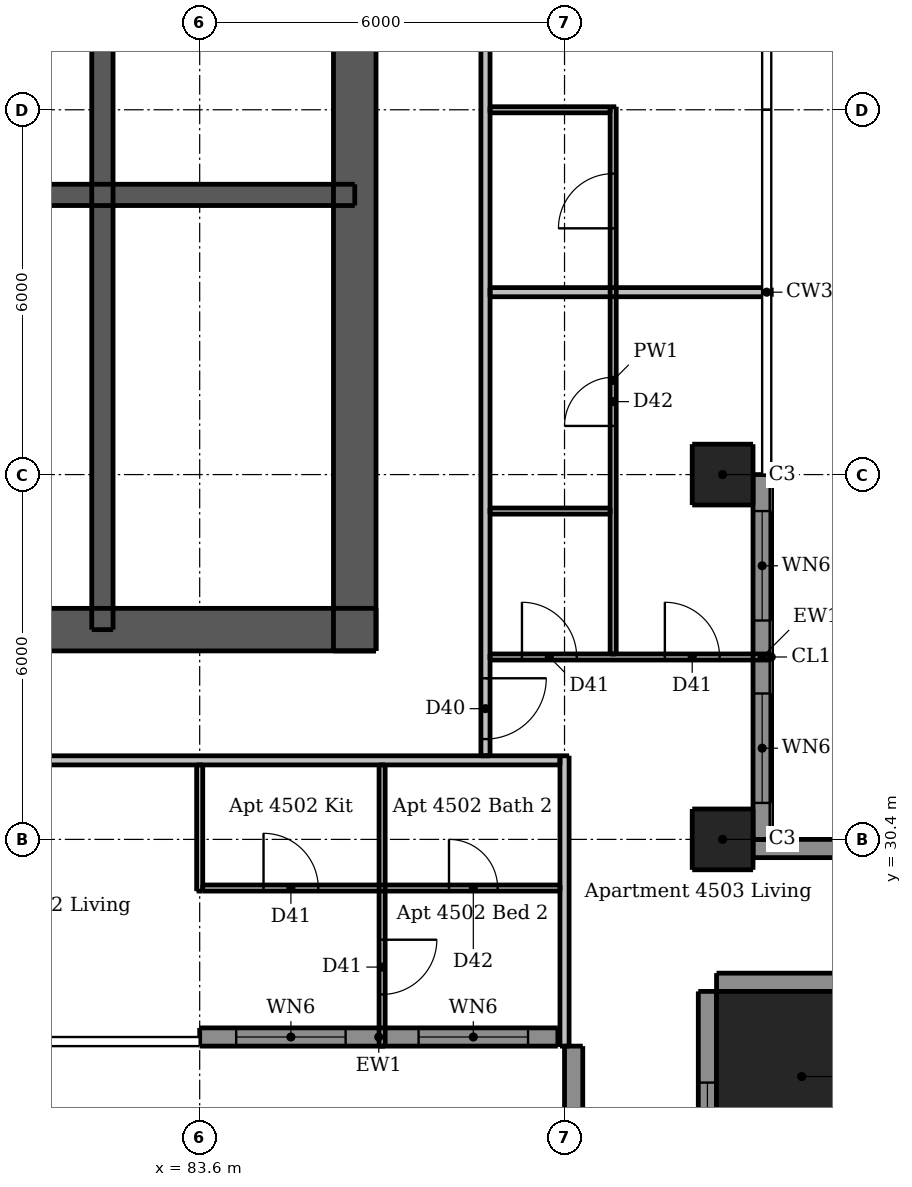
"""IFC4 building model, lengths in metres.
Left out: names, types, materials, properties, quantities, classifications, styles, units other than length and angle.
Written with IfcOpenShell. Run it as: python <this file> out.ifc"""

import sys

from ifc_helpers import new_model, si_unit, direction, frame, frame_2d, origin, origin_2d, place, context, subcontext, project, spatial, rectangle, extrude, element, fill, save


model = new_model("IFC4")
c1 = context("Model", 3, precision=1e-05, world=origin(), true_north=direction((0.0, 1.0)))
c2 = subcontext(c1, "Body", "Model", "MODEL_VIEW")
j1 = project(units=[si_unit("LENGTHUNIT", "METRE"), si_unit("PLANEANGLEUNIT", "RADIAN")], contexts=[c1])
p1 = place(None, origin())
s1 = spatial("IfcSite", under=j1, at=p1, CompositionType="ELEMENT")
p2 = place(p1, origin())
s2 = spatial("IfcBuilding", under=s1, at=p2, CompositionType="ELEMENT")
p3 = place(p2, frame((0.0, 0.0, 168.1)))
s3 = spatial("IfcBuildingStorey", under=s2, at=p3, CompositionType="ELEMENT", Elevation=168.1)
p4 = place(p3, frame((62.5, 33.85, 0.0), z_axis=(0.0, 0.0, 1.0), x_axis=(1.0, 0.0, 0.0)))
e1 = element("IfcWall", 1, at=p4, inside=s3, PredefinedType="SHEAR", context=c2, shape_type="SweptSolid", body=[
    extrude(rectangle(XDim=24.0, YDim=0.7, at=frame_2d((12.0, 0.0))), origin(), (0.0, 0.0, 1.0), 3.05),
])
p5 = place(p4, frame((1.962, 0.0, 0.0)))
e2 = element("IfcOpeningElement", 2, at=p5, cuts=e1, PredefinedType="OPENING", context=c2, shape_type="SweptSolid", body=[
    extrude(rectangle(XDim=1.1, YDim=2.1, at=frame_2d((0.55, 1.05))), frame((0.0, 0.36, 0.0), z_axis=(0.0, -1.0, 0.0), x_axis=(1.0, 0.0, 0.0)), (0.0, 0.0, 1.0), 0.72),
])
p6 = place(p4, frame((20.938, 0.0, 0.0)))
e3 = element("IfcOpeningElement", 3, at=p6, cuts=e1, PredefinedType="OPENING", context=c2, shape_type="SweptSolid", body=[
    extrude(rectangle(XDim=1.1, YDim=2.1, at=frame_2d((0.55, 1.05))), frame((0.0, 0.36, 0.0), z_axis=(0.0, -1.0, 0.0), x_axis=(1.0, 0.0, 0.0)), (0.0, 0.0, 1.0), 0.72),
])
p7 = place(p4, frame((8.0, 0.0, 0.0)))
e4 = element("IfcOpeningElement", 4, at=p7, cuts=e1, PredefinedType="OPENING", context=c2, shape_type="SweptSolid", body=[
    extrude(rectangle(XDim=1.1, YDim=2.1, at=frame_2d((0.55, 1.05))), frame((0.0, 0.36, 0.0), z_axis=(0.0, -1.0, 0.0), x_axis=(1.0, 0.0, 0.0)), (0.0, 0.0, 1.0), 0.72),
])
p8 = place(p4, frame((15.3, 0.0, 0.0)))
e5 = element("IfcOpeningElement", 5, at=p8, cuts=e1, PredefinedType="OPENING", context=c2, shape_type="SweptSolid", body=[
    extrude(rectangle(XDim=0.9, YDim=2.1, at=frame_2d((0.45, 1.05))), frame((0.0, 0.36, 0.0), z_axis=(0.0, -1.0, 0.0), x_axis=(1.0, 0.0, 0.0)), (0.0, 0.0, 1.0), 0.72),
])
p9 = place(p3, frame((86.15, 33.5, 0.0), z_axis=(0.0, 0.0, 1.0), x_axis=(0.0, 1.0, 0.0)))
e6 = element("IfcWall", 6, at=p9, inside=s3, PredefinedType="SHEAR", context=c2, shape_type="SweptSolid", body=[
    extrude(rectangle(XDim=24.0, YDim=0.7, at=frame_2d((12.0, 0.0))), origin(), (0.0, 0.0, 1.0), 3.05),
])
p10 = place(p9, frame((11.2, 0.0, 0.0)))
e7 = element("IfcOpeningElement", 7, at=p10, cuts=e6, PredefinedType="OPENING", context=c2, shape_type="SweptSolid", body=[
    extrude(rectangle(XDim=1.6, YDim=2.1, at=frame_2d((0.8, 1.05))), frame((0.0, 0.36, 0.0), z_axis=(0.0, -1.0, 0.0), x_axis=(1.0, 0.0, 0.0)), (0.0, 0.0, 1.0), 0.72),
])
p11 = place(p3, frame((62.85, 41.0, 0.0), z_axis=(0.0, 0.0, 1.0), x_axis=(1.0, 0.0, 0.0)))
e8 = element("IfcWall", 8, at=p11, inside=s3, PredefinedType="SHEAR", context=c2, shape_type="SweptSolid", body=[
    extrude(rectangle(XDim=23.3, YDim=0.35, at=frame_2d((11.65, 0.0))), origin(), (0.0, 0.0, 1.0), 3.05),
])
p12 = place(p3, frame((82.0, 33.85, 0.0), z_axis=(0.0, 0.0, 1.0), x_axis=(0.0, 1.0, 0.0)))
e9 = element("IfcWall", 9, at=p12, inside=s3, PredefinedType="SHEAR", context=c2, shape_type="SweptSolid", body=[
    extrude(rectangle(XDim=10.05, YDim=0.35, at=frame_2d((5.025, 0.0))), origin(), (0.0, 0.0, 1.0), 3.05),
])
for number, where, z_axis, x_axis in (
    (10, (92.2, 30.4, 0.0), (0.0, 0.0, 1.0), (1.0, 0.0, 0.0)),
    (11, (92.2, 36.4, 0.0), (0.0, 0.0, 1.0), (1.0, 0.0, 0.0)),
):
    element("IfcColumn", number, at=place(p3, frame(where, z_axis=z_axis, x_axis=x_axis)), inside=s3, PredefinedType="COLUMN", context=c2, shape_type="SweptSolid", body=[
        extrude(rectangle(XDim=1.0, YDim=1.0, at=origin_2d()), origin(), (0.0, 0.0, 1.0), 3.05),
    ])
p13 = place(p3, frame((93.5, 26.5, 0.0), z_axis=(0.0, 0.0, 1.0), x_axis=(1.0, 0.0, 0.0)))
e12 = element("IfcColumn", 12, at=p13, inside=s3, PredefinedType="COLUMN", context=c2, shape_type="SweptSolid", body=[
    extrude(rectangle(XDim=2.8, YDim=2.8, at=origin_2d()), origin(), (0.0, 0.0, 1.0), 3.3),
])
p14 = place(p3, frame((89.75, 27.0, 0.0), z_axis=(0.0, 0.0, 1.0), x_axis=(0.0, -1.0, 0.0)))
e13 = element("IfcWall", 13, at=p14, inside=s3, PredefinedType="SOLIDWALL", context=c2, shape_type="SweptSolid", body=[
    extrude(rectangle(XDim=1.7, YDim=0.3, at=frame_2d((0.85, 0.0))), origin(), (0.0, 0.0, 1.0), 3.05),
])
p15 = place(p3, frame((91.95, 22.5, 0.0), z_axis=(0.0, 0.0, 1.0), x_axis=(0.0, 1.0, 0.0)))
e14 = element("IfcWall", 14, at=p15, inside=s3, PredefinedType="SOLIDWALL", context=c2, shape_type="SweptSolid", body=[
    extrude(rectangle(XDim=5.4, YDim=0.3, at=frame_2d((2.7, 0.0))), origin(), (0.0, 0.0, 1.0), 3.05),
])
p16 = place(p15, frame((1.5, 0.0, 0.15)))
e15 = element("IfcOpeningElement", 15, at=p16, cuts=e14, PredefinedType="OPENING", context=c2, shape_type="SweptSolid", body=[
    extrude(rectangle(XDim=2.4, YDim=2.1, at=frame_2d((1.2, 1.05))), frame((0.0, 0.16, 0.0), z_axis=(0.0, -1.0, 0.0), x_axis=(1.0, 0.0, 0.0)), (0.0, 0.0, 1.0), 0.32),
])
p17 = place(p3, frame((92.1, 28.05, 0.0), z_axis=(0.0, 0.0, 1.0), x_axis=(1.0, 0.0, 0.0)))
e16 = element("IfcWall", 16, at=p17, inside=s3, PredefinedType="SOLIDWALL", context=c2, shape_type="SweptSolid", body=[
    extrude(rectangle(XDim=5.4, YDim=0.3, at=frame_2d((2.7, 0.0))), origin(), (0.0, 0.0, 1.0), 3.05),
])
p18 = place(p3, frame((97.5, 30.25, 0.0), z_axis=(0.0, 0.0, 1.0), x_axis=(-1.0, 0.0, 0.0)))
e17 = element("IfcWall", 17, at=p18, inside=s3, PredefinedType="SOLIDWALL", context=c2, shape_type="SweptSolid", body=[
    extrude(rectangle(XDim=4.8, YDim=0.3, at=frame_2d((2.4, 0.0))), origin(), (0.0, 0.0, 1.0), 3.05),
])
p19 = place(p18, frame((1.05, 0.0, 0.15)))
e18 = element("IfcOpeningElement", 18, at=p19, cuts=e17, PredefinedType="OPENING", context=c2, shape_type="SweptSolid", body=[
    extrude(rectangle(XDim=2.4, YDim=2.1, at=frame_2d((1.2, 1.05))), frame((0.0, 0.16, 0.0), z_axis=(0.0, -1.0, 0.0), x_axis=(1.0, 0.0, 0.0)), (0.0, 0.0, 1.0), 0.32),
])
p20 = place(p3, frame((83.6, 27.15, 0.0), z_axis=(0.0, 0.0, 1.0), x_axis=(1.0, 0.0, 0.0)))
e19 = element("IfcWall", 19, at=p20, inside=s3, PredefinedType="SOLIDWALL", context=c2, shape_type="SweptSolid", body=[
    extrude(rectangle(XDim=5.89, YDim=0.3, at=frame_2d((2.945, 0.0))), origin(), (0.0, 0.0, 1.0), 3.05),
])
p21 = place(p20, frame((0.6, 0.0, 0.15)))
e20 = element("IfcOpeningElement", 20, at=p21, cuts=e19, PredefinedType="OPENING", context=c2, shape_type="SweptSolid", body=[
    extrude(rectangle(XDim=1.8, YDim=2.1, at=frame_2d((0.9, 1.05))), frame((0.0, 0.16, 0.0), z_axis=(0.0, -1.0, 0.0), x_axis=(1.0, 0.0, 0.0)), (0.0, 0.0, 1.0), 0.32),
])
p22 = place(p20, frame((3.6, 0.0, 0.15)))
e21 = element("IfcOpeningElement", 21, at=p22, cuts=e19, PredefinedType="OPENING", context=c2, shape_type="SweptSolid", body=[
    extrude(rectangle(XDim=1.8, YDim=2.1, at=frame_2d((0.9, 1.05))), frame((0.0, 0.16, 0.0), z_axis=(0.0, -1.0, 0.0), x_axis=(1.0, 0.0, 0.0)), (0.0, 0.0, 1.0), 0.32),
])
p23 = place(p3, frame((92.85, 30.4, 0.0), z_axis=(0.0, 0.0, 1.0), x_axis=(0.0, 1.0, 0.0)))
e22 = element("IfcWall", 22, at=p23, inside=s3, PredefinedType="SOLIDWALL", context=c2, shape_type="SweptSolid", body=[
    extrude(rectangle(XDim=6.0, YDim=0.3, at=frame_2d((3.0, 0.0))), origin(), (0.0, 0.0, 1.0), 3.05),
])
p24 = place(p23, frame((0.6, 0.0, 0.15)))
e23 = element("IfcOpeningElement", 23, at=p24, cuts=e22, PredefinedType="OPENING", context=c2, shape_type="SweptSolid", body=[
    extrude(rectangle(XDim=1.8, YDim=2.1, at=frame_2d((0.9, 1.05))), frame((0.0, 0.16, 0.0), z_axis=(0.0, -1.0, 0.0), x_axis=(1.0, 0.0, 0.0)), (0.0, 0.0, 1.0), 0.32),
])
p25 = place(p23, frame((3.6, 0.0, 0.15)))
e24 = element("IfcOpeningElement", 24, at=p25, cuts=e22, PredefinedType="OPENING", context=c2, shape_type="SweptSolid", body=[
    extrude(rectangle(XDim=1.8, YDim=2.1, at=frame_2d((0.9, 1.05))), frame((0.0, 0.16, 0.0), z_axis=(0.0, -1.0, 0.0), x_axis=(1.0, 0.0, 0.0)), (0.0, 0.0, 1.0), 0.32),
])
p26 = place(p3, frame((83.6, 29.55, 0.0), z_axis=(0.0, 0.0, 1.0), x_axis=(0.0, 1.0, 0.0)))
e25 = element("IfcWall", 25, at=p26, inside=s3, PredefinedType="PARTITIONING", context=c2, shape_type="SweptSolid", body=[
    extrude(rectangle(XDim=2.075, YDim=0.1, at=frame_2d((1.038, 0.0))), origin(), (0.0, 0.0, 1.0), 2.59),
])
p27 = place(p3, frame((86.6, 31.625, 0.0), z_axis=(0.0, 0.0, 1.0), x_axis=(0.0, -1.0, 0.0)))
e26 = element("IfcWall", 26, at=p27, inside=s3, PredefinedType="PARTITIONING", context=c2, shape_type="SweptSolid", body=[
    extrude(rectangle(XDim=4.625, YDim=0.1, at=frame_2d((2.312, 0.0))), origin(), (0.0, 0.0, 1.0), 3.05),
])
p28 = place(p27, frame((2.875, 0.0, 0.0)))
e27 = element("IfcOpeningElement", 27, at=p28, cuts=e26, PredefinedType="OPENING", context=c2, shape_type="SweptSolid", body=[
    extrude(rectangle(XDim=0.9, YDim=2.1, at=frame_2d((0.45, 1.05))), frame((0.0, 0.06, 0.0), z_axis=(0.0, -1.0, 0.0), x_axis=(1.0, 0.0, 0.0)), (0.0, 0.0, 1.0), 0.12),
])
p29 = place(p3, frame((90.4, 33.45, 0.0), z_axis=(0.0, 0.0, 1.0), x_axis=(0.0, 1.0, 0.0)))
e28 = element("IfcWall", 28, at=p29, inside=s3, PredefinedType="PARTITIONING", context=c2, shape_type="SweptSolid", body=[
    extrude(rectangle(XDim=9.0, YDim=0.1, at=frame_2d((4.5, 0.0))), origin(), (0.0, 0.0, 1.0), 3.05),
])
p30 = place(p29, frame((3.75, 0.0, 0.0)))
e29 = element("IfcOpeningElement", 29, at=p30, cuts=e28, PredefinedType="OPENING", context=c2, shape_type="SweptSolid", body=[
    extrude(rectangle(XDim=0.8, YDim=2.1, at=frame_2d((0.4, 1.05))), frame((0.0, 0.06, 0.0), z_axis=(0.0, -1.0, 0.0), x_axis=(1.0, 0.0, 0.0)), (0.0, 0.0, 1.0), 0.12),
])
p31 = place(p29, frame((7.0, 0.0, 0.0)))
e30 = element("IfcOpeningElement", 30, at=p31, cuts=e28, PredefinedType="OPENING", context=c2, shape_type="SweptSolid", body=[
    extrude(rectangle(XDim=0.9, YDim=2.1, at=frame_2d((0.45, 1.05))), frame((0.0, 0.06, 0.0), z_axis=(0.0, -1.0, 0.0), x_axis=(1.0, 0.0, 0.0)), (0.0, 0.0, 1.0), 0.12),
])
p32 = place(p3, frame((88.375, 42.4, 0.0), z_axis=(0.0, 0.0, 1.0), x_axis=(1.0, 0.0, 0.0)))
e31 = element("IfcWall", 31, at=p32, inside=s3, PredefinedType="PARTITIONING", context=c2, shape_type="SweptSolid", body=[
    extrude(rectangle(XDim=1.975, YDim=0.1, at=frame_2d((0.988, 0.0))), origin(), (0.0, 0.0, 1.0), 2.59),
])
p33 = place(p3, frame((88.375, 35.8, 0.0), z_axis=(0.0, 0.0, 1.0), x_axis=(1.0, 0.0, 0.0)))
e32 = element("IfcWall", 32, at=p33, inside=s3, PredefinedType="PARTITIONING", context=c2, shape_type="SweptSolid", body=[
    extrude(rectangle(XDim=1.975, YDim=0.1, at=frame_2d((0.988, 0.0))), origin(), (0.0, 0.0, 1.0), 3.05),
])
p34 = place(p3, frame((88.375, 33.4, 0.0), z_axis=(0.0, 0.0, 1.0), x_axis=(1.0, 0.0, 0.0)))
e33 = element("IfcWall", 33, at=p34, inside=s3, PredefinedType="PARTITIONING", context=c2, shape_type="SweptSolid", body=[
    extrude(rectangle(XDim=4.625, YDim=0.1, at=frame_2d((2.312, 0.0))), origin(), (0.0, 0.0, 1.0), 3.05),
])
p35 = place(p34, frame((0.525, 0.0, 0.0)))
e34 = element("IfcOpeningElement", 34, at=p35, cuts=e33, PredefinedType="OPENING", context=c2, shape_type="SweptSolid", body=[
    extrude(rectangle(XDim=0.9, YDim=2.1, at=frame_2d((0.45, 1.05))), frame((0.0, 0.06, 0.0), z_axis=(0.0, -1.0, 0.0), x_axis=(1.0, 0.0, 0.0)), (0.0, 0.0, 1.0), 0.12),
])
p36 = place(p34, frame((2.875, 0.0, 0.0)))
e35 = element("IfcOpeningElement", 35, at=p36, cuts=e33, PredefinedType="OPENING", context=c2, shape_type="SweptSolid", body=[
    extrude(rectangle(XDim=0.9, YDim=2.1, at=frame_2d((0.45, 1.05))), frame((0.0, 0.06, 0.0), z_axis=(0.0, -1.0, 0.0), x_axis=(1.0, 0.0, 0.0)), (0.0, 0.0, 1.0), 0.12),
])
p37 = place(p3, frame((83.65, 29.6, 0.0), z_axis=(0.0, 0.0, 1.0), x_axis=(1.0, 0.0, 0.0)))
e36 = element("IfcWall", 36, at=p37, inside=s3, PredefinedType="PARTITIONING", context=c2, shape_type="SweptSolid", body=[
    extrude(rectangle(XDim=5.875, YDim=0.1, at=frame_2d((2.938, 0.0))), origin(), (0.0, 0.0, 1.0), 3.05),
])
p38 = place(p37, frame((1.0, 0.0, 0.0)))
e37 = element("IfcOpeningElement", 37, at=p38, cuts=e36, PredefinedType="OPENING", context=c2, shape_type="SweptSolid", body=[
    extrude(rectangle(XDim=0.9, YDim=2.1, at=frame_2d((0.45, 1.05))), frame((0.0, 0.06, 0.0), z_axis=(0.0, -1.0, 0.0), x_axis=(1.0, 0.0, 0.0)), (0.0, 0.0, 1.0), 0.12),
])
p39 = place(p37, frame((4.05, 0.0, 0.0)))
e38 = element("IfcOpeningElement", 38, at=p39, cuts=e36, PredefinedType="OPENING", context=c2, shape_type="SweptSolid", body=[
    extrude(rectangle(XDim=0.8, YDim=2.1, at=frame_2d((0.4, 1.05))), frame((0.0, 0.06, 0.0), z_axis=(0.0, -1.0, 0.0), x_axis=(1.0, 0.0, 0.0)), (0.0, 0.0, 1.0), 0.12),
])
p40 = place(p3, frame((88.3, 61.175, 0.0), z_axis=(0.0, 0.0, 1.0), x_axis=(0.0, -1.0, 0.0)))
e39 = element("IfcWall", 39, at=p40, inside=s3, PredefinedType="PARTITIONING", context=c2, shape_type="SweptSolid", body=[
    extrude(rectangle(XDim=29.4, YDim=0.15, at=frame_2d((14.7, 0.0))), origin(), (0.0, 0.0, 1.0), 3.05),
])
p41 = place(p40, frame((28.125, 0.0, 0.0)))
e40 = element("IfcOpeningElement", 40, at=p41, cuts=e39, PredefinedType="OPENING", context=c2, shape_type="SweptSolid", body=[
    extrude(rectangle(XDim=1.0, YDim=2.1, at=frame_2d((0.5, 1.05))), frame((0.0, 0.085, 0.0), z_axis=(0.0, -1.0, 0.0), x_axis=(1.0, 0.0, 0.0)), (0.0, 0.0, 1.0), 0.17),
])
p42 = place(p40, frame((13.775, 0.0, 0.0)))
e41 = element("IfcOpeningElement", 41, at=p42, cuts=e39, PredefinedType="OPENING", context=c2, shape_type="SweptSolid", body=[
    extrude(rectangle(XDim=1.0, YDim=2.1, at=frame_2d((0.5, 1.05))), frame((0.0, 0.085, 0.0), z_axis=(0.0, -1.0, 0.0), x_axis=(1.0, 0.0, 0.0)), (0.0, 0.0, 1.0), 0.17),
])
p43 = place(p40, frame((3.275, 0.0, 0.0)))
e42 = element("IfcOpeningElement", 42, at=p43, cuts=e39, PredefinedType="OPENING", context=c2, shape_type="SweptSolid", body=[
    extrude(rectangle(XDim=1.0, YDim=2.1, at=frame_2d((0.5, 1.05))), frame((0.0, 0.085, 0.0), z_axis=(0.0, -1.0, 0.0), x_axis=(1.0, 0.0, 0.0)), (0.0, 0.0, 1.0), 0.17),
])
p44 = place(p3, frame((89.6, 27.0, 0.0), z_axis=(0.0, 0.0, 1.0), x_axis=(0.0, 1.0, 0.0)))
e43 = element("IfcWall", 43, at=p44, inside=s3, PredefinedType="PARTITIONING", context=c2, shape_type="SweptSolid", body=[
    extrude(rectangle(XDim=4.775, YDim=0.15, at=frame_2d((2.387, 0.0))), origin(), (0.0, 0.0, 1.0), 2.51),
])
p45 = place(p3, frame((88.375, 39.4, 0.0), z_axis=(0.0, 0.0, 1.0), x_axis=(1.0, 0.0, 0.0)))
e44 = element("IfcWall", 44, at=p45, inside=s3, PredefinedType="PARTITIONING", context=c2, shape_type="SweptSolid", body=[
    extrude(rectangle(XDim=4.625, YDim=0.15, at=frame_2d((2.312, 0.0))), origin(), (0.0, 0.0, 1.0), 3.05),
])
p46 = place(p3, frame((89.525, 31.7, 0.0), z_axis=(0.0, 0.0, 1.0), x_axis=(-1.0, 0.0, 0.0)))
e45 = element("IfcWall", 45, at=p46, inside=s3, PredefinedType="PARTITIONING", context=c2, shape_type="SweptSolid", body=[
    extrude(rectangle(XDim=30.55, YDim=0.15, at=frame_2d((15.275, 0.0))), origin(), (0.0, 0.0, 1.0), 3.05),
])
p47 = place(p46, frame((28.275, 0.0, 0.0)))
e46 = element("IfcOpeningElement", 46, at=p47, cuts=e45, PredefinedType="OPENING", context=c2, shape_type="SweptSolid", body=[
    extrude(rectangle(XDim=1.0, YDim=2.1, at=frame_2d((0.5, 1.05))), frame((0.0, 0.085, 0.0), z_axis=(0.0, -1.0, 0.0), x_axis=(1.0, 0.0, 0.0)), (0.0, 0.0, 1.0), 0.17),
])
p48 = place(p46, frame((9.925, 0.0, 0.0)))
e47 = element("IfcOpeningElement", 47, at=p48, cuts=e45, PredefinedType="OPENING", context=c2, shape_type="SweptSolid", body=[
    extrude(rectangle(XDim=1.0, YDim=2.1, at=frame_2d((0.5, 1.05))), frame((0.0, 0.085, 0.0), z_axis=(0.0, -1.0, 0.0), x_axis=(1.0, 0.0, 0.0)), (0.0, 0.0, 1.0), 0.17),
])
p49 = place(p16, origin())
e48 = element("IfcWindow", 48, at=p49, inside=s3, PartitioningType="DOUBLE_PANEL_VERTICAL", PredefinedType="WINDOW", context=c2, shape_type="SweptSolid", body=[
    extrude(rectangle(XDim=2.4, YDim=2.1, at=frame_2d((1.2, 1.05))), frame((0.0, 0.03, 0.0), z_axis=(0.0, -1.0, 0.0), x_axis=(1.0, 0.0, 0.0)), (0.0, 0.0, 1.0), 0.06),
])
fill(e15, e48)
p50 = place(p21, origin())
e49 = element("IfcWindow", 49, at=p50, inside=s3, PartitioningType="DOUBLE_PANEL_VERTICAL", PredefinedType="WINDOW", context=c2, shape_type="SweptSolid", body=[
    extrude(rectangle(XDim=1.8, YDim=2.1, at=frame_2d((0.9, 1.05))), frame((0.0, 0.03, 0.0), z_axis=(0.0, -1.0, 0.0), x_axis=(1.0, 0.0, 0.0)), (0.0, 0.0, 1.0), 0.06),
])
fill(e20, e49)
p51 = place(p22, origin())
e50 = element("IfcWindow", 50, at=p51, inside=s3, PartitioningType="DOUBLE_PANEL_VERTICAL", PredefinedType="WINDOW", context=c2, shape_type="SweptSolid", body=[
    extrude(rectangle(XDim=1.8, YDim=2.1, at=frame_2d((0.9, 1.05))), frame((0.0, 0.03, 0.0), z_axis=(0.0, -1.0, 0.0), x_axis=(1.0, 0.0, 0.0)), (0.0, 0.0, 1.0), 0.06),
])
fill(e21, e50)
p52 = place(p24, origin())
e51 = element("IfcWindow", 51, at=p52, inside=s3, PartitioningType="DOUBLE_PANEL_VERTICAL", PredefinedType="WINDOW", context=c2, shape_type="SweptSolid", body=[
    extrude(rectangle(XDim=1.8, YDim=2.1, at=frame_2d((0.9, 1.05))), frame((0.0, 0.03, 0.0), z_axis=(0.0, -1.0, 0.0), x_axis=(1.0, 0.0, 0.0)), (0.0, 0.0, 1.0), 0.06),
])
fill(e23, e51)
p53 = place(p25, origin())
e52 = element("IfcWindow", 52, at=p53, inside=s3, PartitioningType="DOUBLE_PANEL_VERTICAL", PredefinedType="WINDOW", context=c2, shape_type="SweptSolid", body=[
    extrude(rectangle(XDim=1.8, YDim=2.1, at=frame_2d((0.9, 1.05))), frame((0.0, 0.03, 0.0), z_axis=(0.0, -1.0, 0.0), x_axis=(1.0, 0.0, 0.0)), (0.0, 0.0, 1.0), 0.06),
])
fill(e24, e52)
p54 = place(p6, origin())
e53 = element("IfcDoor", 53, at=p54, inside=s3, OperationType="SINGLE_SWING_RIGHT", PredefinedType="DOOR", context=c2, shape_type="SweptSolid", body=[
    extrude(rectangle(XDim=1.1, YDim=2.1, at=frame_2d((0.55, 1.05))), frame((0.0, 0.337, 0.0), z_axis=(0.0, -1.0, 0.0), x_axis=(1.0, 0.0, 0.0)), (0.0, 0.0, 1.0), 0.05),
])
fill(e3, e53)
p55 = place(p38, origin())
e54 = element("IfcDoor", 54, at=p55, inside=s3, OperationType="SINGLE_SWING_LEFT", PredefinedType="DOOR", context=c2, shape_type="SweptSolid", body=[
    extrude(rectangle(XDim=0.9, YDim=2.1, at=frame_2d((0.45, 1.05))), frame((0.0, 0.025, 0.0), z_axis=(0.0, -1.0, 0.0), x_axis=(1.0, 0.0, 0.0)), (0.0, 0.0, 1.0), 0.05),
])
fill(e37, e54)
p56 = place(p28, origin())
e55 = element("IfcDoor", 55, at=p56, inside=s3, OperationType="SINGLE_SWING_LEFT", PredefinedType="DOOR", context=c2, shape_type="SweptSolid", body=[
    extrude(rectangle(XDim=0.9, YDim=2.1, at=frame_2d((0.45, 1.05))), frame((0.0, 0.025, 0.0), z_axis=(0.0, -1.0, 0.0), x_axis=(1.0, 0.0, 0.0)), (0.0, 0.0, 1.0), 0.05),
])
fill(e27, e55)
p57 = place(p39, origin())
e56 = element("IfcDoor", 56, at=p57, inside=s3, OperationType="SINGLE_SWING_LEFT", PredefinedType="DOOR", context=c2, shape_type="SweptSolid", body=[
    extrude(rectangle(XDim=0.8, YDim=2.1, at=frame_2d((0.4, 1.05))), frame((0.0, 0.025, 0.0), z_axis=(0.0, -1.0, 0.0), x_axis=(1.0, 0.0, 0.0)), (0.0, 0.0, 1.0), 0.05),
])
fill(e38, e56)
p58 = place(p41, origin())
e57 = element("IfcDoor", 57, at=p58, inside=s3, OperationType="SINGLE_SWING_LEFT", PredefinedType="DOOR", context=c2, shape_type="SweptSolid", body=[
    extrude(rectangle(XDim=1.0, YDim=2.1, at=frame_2d((0.5, 1.05))), frame((0.0, 0.025, 0.0), z_axis=(0.0, -1.0, 0.0), x_axis=(1.0, 0.0, 0.0)), (0.0, 0.0, 1.0), 0.05),
])
fill(e40, e57)
p59 = place(p35, origin())
e58 = element("IfcDoor", 58, at=p59, inside=s3, OperationType="SINGLE_SWING_LEFT", PredefinedType="DOOR", context=c2, shape_type="SweptSolid", body=[
    extrude(rectangle(XDim=0.9, YDim=2.1, at=frame_2d((0.45, 1.05))), frame((0.0, 0.025, 0.0), z_axis=(0.0, -1.0, 0.0), x_axis=(1.0, 0.0, 0.0)), (0.0, 0.0, 1.0), 0.05),
])
fill(e34, e58)
p60 = place(p36, origin())
e59 = element("IfcDoor", 59, at=p60, inside=s3, OperationType="SINGLE_SWING_LEFT", PredefinedType="DOOR", context=c2, shape_type="SweptSolid", body=[
    extrude(rectangle(XDim=0.9, YDim=2.1, at=frame_2d((0.45, 1.05))), frame((0.0, 0.025, 0.0), z_axis=(0.0, -1.0, 0.0), x_axis=(1.0, 0.0, 0.0)), (0.0, 0.0, 1.0), 0.05),
])
fill(e35, e59)
p61 = place(p30, origin())
e60 = element("IfcDoor", 60, at=p61, inside=s3, OperationType="SINGLE_SWING_LEFT", PredefinedType="DOOR", context=c2, shape_type="SweptSolid", body=[
    extrude(rectangle(XDim=0.8, YDim=2.1, at=frame_2d((0.4, 1.05))), frame((0.0, 0.025, 0.0), z_axis=(0.0, -1.0, 0.0), x_axis=(1.0, 0.0, 0.0)), (0.0, 0.0, 1.0), 0.05),
])
fill(e29, e60)
p62 = place(p31, origin())
e61 = element("IfcDoor", 61, at=p62, inside=s3, OperationType="SINGLE_SWING_LEFT", PredefinedType="DOOR", context=c2, shape_type="SweptSolid", body=[
    extrude(rectangle(XDim=0.9, YDim=2.1, at=frame_2d((0.45, 1.05))), frame((0.0, 0.025, 0.0), z_axis=(0.0, -1.0, 0.0), x_axis=(1.0, 0.0, 0.0)), (0.0, 0.0, 1.0), 0.05),
])
fill(e30, e61)
save(model, sys.argv[1])
